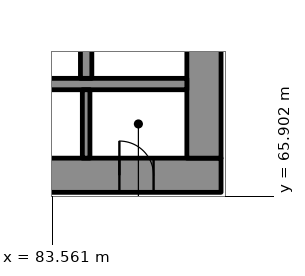
"""IFC4 building model, lengths in metres.
Left out: names, types, materials, properties, quantities, classifications, styles, units other than length and angle.
Written with IfcOpenShell. Run it as: python <this file> out.ifc"""

import sys

from ifc_helpers import new_model, si_unit, direction, frame, frame_2d, origin, place, context, subcontext, project, spatial, rectangle, extrude, element, fill, save


model = new_model("IFC4")
c1 = context("Model", 3, precision=1e-05, world=origin(), true_north=direction((0.0, 1.0)))
c2 = subcontext(c1, "Body", "Model", "MODEL_VIEW")
j1 = project(units=[si_unit("LENGTHUNIT", "METRE"), si_unit("PLANEANGLEUNIT", "RADIAN")], contexts=[c1])
p1 = place(None, origin())
s1 = spatial("IfcSite", under=j1, at=p1, CompositionType="ELEMENT")
p2 = place(p1, origin())
s2 = spatial("IfcBuilding", under=s1, at=p2, CompositionType="ELEMENT")
p3 = place(p2, frame((0.0, 0.0, 21.8)))
s3 = spatial("IfcBuildingStorey", under=s2, at=p3, CompositionType="ELEMENT", Elevation=21.8)
p4 = place(p3, frame((62.0, 66.45, 0.0), z_axis=(0.0, 0.0, 1.0), x_axis=(1.0, 0.0, 0.0)))
e1 = element("IfcWall", 1, at=p4, inside=s3, PredefinedType="SHEAR", context=c2, shape_type="SweptSolid", body=[
    extrude(rectangle(XDim=26.0, YDim=0.9, at=frame_2d((13.0, 0.0))), origin(), (0.0, 0.0, 1.0), 4.3),
])
p5 = place(p4, frame((3.45, 0.0, 0.0)))
e2 = element("IfcOpeningElement", 2, at=p5, cuts=e1, PredefinedType="OPENING", context=c2, shape_type="SweptSolid", body=[
    extrude(rectangle(XDim=0.9, YDim=2.1, at=frame_2d((0.45, 1.05))), frame((0.0, 0.46, 0.0), z_axis=(0.0, -1.0, 0.0), x_axis=(1.0, 0.0, 0.0)), (0.0, 0.0, 1.0), 0.92),
])
p6 = place(p4, frame((6.425, 0.0, 0.0)))
e3 = element("IfcOpeningElement", 3, at=p6, cuts=e1, PredefinedType="OPENING", context=c2, shape_type="SweptSolid", body=[
    extrude(rectangle(XDim=0.9, YDim=2.1, at=frame_2d((0.45, 1.05))), frame((0.0, 0.46, 0.0), z_axis=(0.0, -1.0, 0.0), x_axis=(1.0, 0.0, 0.0)), (0.0, 0.0, 1.0), 0.92),
])
p7 = place(p4, frame((11.5, 0.0, 0.0)))
e4 = element("IfcOpeningElement", 4, at=p7, cuts=e1, PredefinedType="OPENING", context=c2, shape_type="SweptSolid", body=[
    extrude(rectangle(XDim=0.9, YDim=2.1, at=frame_2d((0.45, 1.05))), frame((0.0, 0.46, 0.0), z_axis=(0.0, -1.0, 0.0), x_axis=(1.0, 0.0, 0.0)), (0.0, 0.0, 1.0), 0.92),
])
p8 = place(p4, frame((18.5, 0.0, 0.0)))
e5 = element("IfcOpeningElement", 5, at=p8, cuts=e1, PredefinedType="OPENING", context=c2, shape_type="SweptSolid", body=[
    extrude(rectangle(XDim=0.9, YDim=2.1, at=frame_2d((0.45, 1.05))), frame((0.0, 0.46, 0.0), z_axis=(0.0, -1.0, 0.0), x_axis=(1.0, 0.0, 0.0)), (0.0, 0.0, 1.0), 0.92),
])
p9 = place(p4, frame((23.325, 0.0, 0.0)))
e6 = element("IfcOpeningElement", 6, at=p9, cuts=e1, PredefinedType="OPENING", context=c2, shape_type="SweptSolid", body=[
    extrude(rectangle(XDim=0.9, YDim=2.1, at=frame_2d((0.45, 1.05))), frame((0.0, 0.46, 0.0), z_axis=(0.0, -1.0, 0.0), x_axis=(1.0, 0.0, 0.0)), (0.0, 0.0, 1.0), 0.92),
])
p10 = place(p3, frame((87.55, 66.9, 0.0), z_axis=(0.0, 0.0, 1.0), x_axis=(0.0, 1.0, 0.0)))
e7 = element("IfcWall", 7, at=p10, inside=s3, PredefinedType="SHEAR", context=c2, shape_type="SweptSolid", body=[
    extrude(rectangle(XDim=16.2, YDim=0.9, at=frame_2d((8.1, 0.0))), origin(), (0.0, 0.0, 1.0), 4.3),
])
p11 = place(p10, frame((5.5, 0.0, 0.0)))
e8 = element("IfcOpeningElement", 8, at=p11, cuts=e7, PredefinedType="OPENING", context=c2, shape_type="SweptSolid", body=[
    extrude(rectangle(XDim=1.8, YDim=2.1, at=frame_2d((0.9, 1.05))), frame((0.0, 0.46, 0.0), z_axis=(0.0, -1.0, 0.0), x_axis=(1.0, 0.0, 0.0)), (0.0, 0.0, 1.0), 0.92),
])
p12 = place(p10, frame((12.272, 0.0, 0.0)))
e9 = element("IfcOpeningElement", 9, at=p12, cuts=e7, PredefinedType="OPENING", context=c2, shape_type="SweptSolid", body=[
    extrude(rectangle(XDim=0.9, YDim=2.1, at=frame_2d((0.45, 1.05))), frame((0.0, 0.46, 0.0), z_axis=(0.0, -1.0, 0.0), x_axis=(1.0, 0.0, 0.0)), (0.0, 0.0, 1.0), 0.92),
])
p13 = place(p3, frame((70.35, 68.85, 0.0), z_axis=(0.0, 0.0, 1.0), x_axis=(1.0, 0.0, 0.0)))
e10 = element("IfcWall", 10, at=p13, inside=s3, PredefinedType="SHEAR", context=c2, shape_type="SweptSolid", body=[
    extrude(rectangle(XDim=16.75, YDim=0.3, at=frame_2d((8.375, 0.0))), origin(), (0.0, 0.0, 1.0), 4.3),
])
p14 = place(p3, frame((84.45, 69.0, 0.0), z_axis=(0.0, 0.0, 1.0), x_axis=(0.0, 1.0, 0.0)))
e11 = element("IfcWall", 11, at=p14, inside=s3, PredefinedType="SHEAR", context=c2, shape_type="SweptSolid", body=[
    extrude(rectangle(XDim=2.6, YDim=0.3, at=frame_2d((1.3, 0.0))), origin(), (0.0, 0.0, 1.0), 4.3),
])
p15 = place(p3, frame((84.45, 66.9, 0.0), z_axis=(0.0, 0.0, 1.0), x_axis=(0.0, 1.0, 0.0)))
e12 = element("IfcWall", 12, at=p15, inside=s3, PredefinedType="PARTITIONING", context=c2, shape_type="SweptSolid", body=[
    extrude(rectangle(XDim=1.8, YDim=0.2, at=frame_2d((0.9, 0.0))), origin(), (0.0, 0.0, 1.0), 4.3),
])
p16 = place(p3, frame((107.106, 62.36, 0.0), z_axis=(0.0, 0.0, 1.0), x_axis=(-0.49999992739, 0.866025445706, 0.0)))
e13 = element("IfcWall", 13, at=p16, inside=s3, PredefinedType="SOLIDWALL", context=c2, shape_type="SweptSolid", body=[
    extrude(rectangle(XDim=54.0, YDim=0.4, at=frame_2d((27.0, 0.0))), origin(), (0.0, 0.0, 1.0), 4.3),
])
p17 = place(p3, frame((112.496, 65.725, 0.0), z_axis=(0.0, 0.0, 1.0), x_axis=(-0.499998673217, 0.866026169802, 0.0)))
e14 = element("IfcWall", 14, at=p17, inside=s3, PredefinedType="PARTITIONING", context=c2, shape_type="SweptSolid", body=[
    extrude(rectangle(XDim=53.48, YDim=0.2, at=frame_2d((26.74, 0.0))), origin(), (0.0, 0.0, 1.0), 4.3),
])
p18 = place(p17, frame((13.08, 0.0, 0.0)))
e15 = element("IfcOpeningElement", 15, at=p18, cuts=e14, PredefinedType="OPENING", context=c2, shape_type="SweptSolid", body=[
    extrude(rectangle(XDim=1.0, YDim=2.1, at=frame_2d((0.5, 1.05))), frame((0.0, 0.11, 0.0), z_axis=(0.0, -1.0, 0.0), x_axis=(1.0, 0.0, 0.0)), (0.0, 0.0, 1.0), 0.22),
])
p19 = place(p17, frame((26.28, 0.0, 0.0)))
e16 = element("IfcOpeningElement", 16, at=p19, cuts=e14, PredefinedType="OPENING", context=c2, shape_type="SweptSolid", body=[
    extrude(rectangle(XDim=1.0, YDim=2.1, at=frame_2d((0.5, 1.05))), frame((0.0, 0.11, 0.0), z_axis=(0.0, -1.0, 0.0), x_axis=(1.0, 0.0, 0.0)), (0.0, 0.0, 1.0), 0.22),
])
p20 = place(p17, frame((43.88, 0.0, 0.0)))
e17 = element("IfcOpeningElement", 17, at=p20, cuts=e14, PredefinedType="OPENING", context=c2, shape_type="SweptSolid", body=[
    extrude(rectangle(XDim=1.0, YDim=2.1, at=frame_2d((0.5, 1.05))), frame((0.0, 0.11, 0.0), z_axis=(0.0, -1.0, 0.0), x_axis=(1.0, 0.0, 0.0)), (0.0, 0.0, 1.0), 0.22),
])
p21 = place(p17, frame((50.58, 0.0, 0.0)))
e18 = element("IfcOpeningElement", 18, at=p21, cuts=e14, PredefinedType="OPENING", context=c2, shape_type="SweptSolid", body=[
    extrude(rectangle(XDim=1.0, YDim=2.1, at=frame_2d((0.5, 1.05))), frame((0.0, 0.11, 0.0), z_axis=(0.0, -1.0, 0.0), x_axis=(1.0, 0.0, 0.0)), (0.0, 0.0, 1.0), 0.22),
])
p22 = place(p9, origin())
e19 = element("IfcDoor", 19, at=p22, inside=s3, OperationType="SINGLE_SWING_LEFT", PredefinedType="DOOR", context=c2, shape_type="SweptSolid", body=[
    extrude(rectangle(XDim=0.9, YDim=2.1, at=frame_2d((0.45, 1.05))), frame((0.0, 0.17, 0.0), z_axis=(0.0, -1.0, 0.0), x_axis=(1.0, 0.0, 0.0)), (0.0, 0.0, 1.0), 0.34),
])
fill(e6, e19)
save(model, sys.argv[1])
